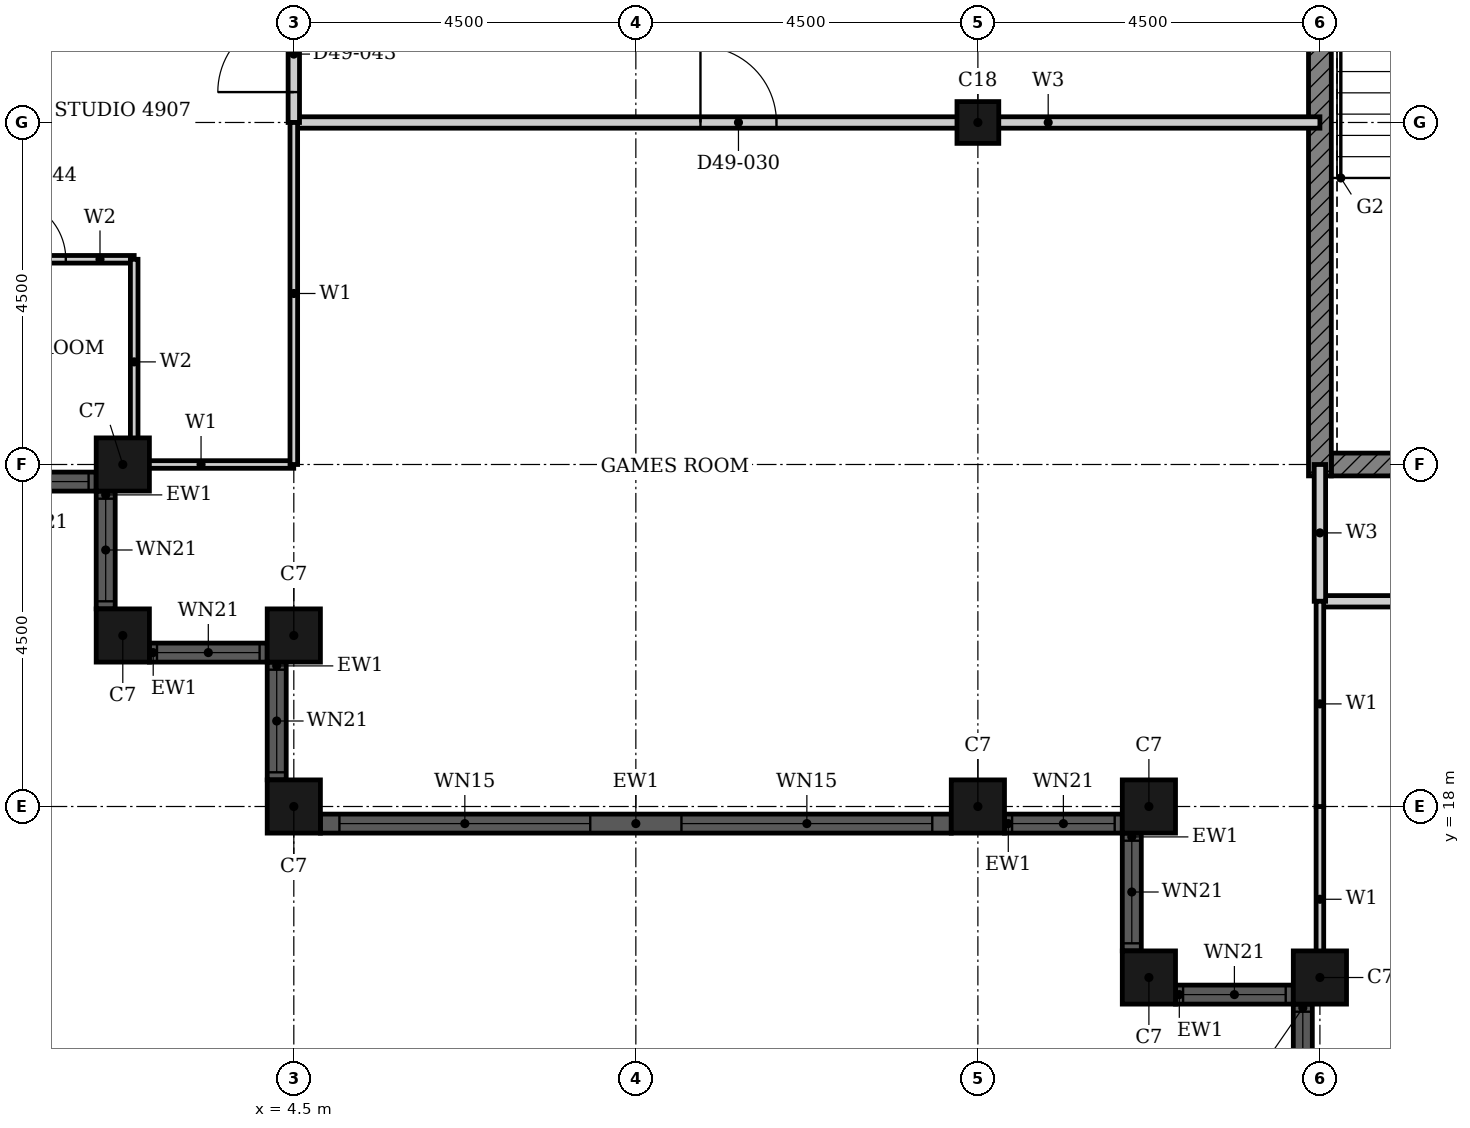
"""IFC4 building model, lengths in metres.
Left out: names, types, materials, properties, quantities, classifications, styles, units other than length and angle.
Written with IfcOpenShell. Run it as: python <this file> out.ifc"""

import sys

from ifc_helpers import new_model, si_unit, direction, frame, frame_2d, origin, origin_2d, place, context, subcontext, project, spatial, rectangle, hollow_rectangle, extrude, element, fill, save


model = new_model("IFC4")
c1 = context("Model", 3, precision=1e-05, world=origin(), true_north=direction((0.0, 1.0)))
c2 = subcontext(c1, "Body", "Model", "MODEL_VIEW")
j1 = project(units=[si_unit("LENGTHUNIT", "METRE"), si_unit("PLANEANGLEUNIT", "RADIAN")], contexts=[c1])
p1 = place(None, origin())
s1 = spatial("IfcSite", under=j1, at=p1, CompositionType="ELEMENT")
p2 = place(p1, origin())
s2 = spatial("IfcBuilding", under=s1, at=p2, CompositionType="ELEMENT")
p3 = place(p2, frame((0.0, 0.0, 196.1)))
s3 = spatial("IfcBuildingStorey", under=s2, at=p3, CompositionType="ELEMENT", Elevation=196.1)
for number, where, z_axis, x_axis in (
    (1, (2.25, 22.5, 0.0), (0.0, 0.0, 1.0), (1.0, 0.0, 0.0)),
    (2, (2.25, 20.25, 0.0), (0.0, 0.0, 1.0), (1.0, 0.0, 0.0)),
    (3, (4.5, 20.25, 0.0), (0.0, 0.0, 1.0), (1.0, 0.0, 0.0)),
    (4, (4.5, 18.0, 0.0), (0.0, 0.0, 1.0), (1.0, 0.0, 0.0)),
    (5, (13.5, 18.0, 0.0), (0.0, 0.0, 1.0), (1.0, 0.0, 0.0)),
    (6, (15.75, 18.0, 0.0), (0.0, 0.0, 1.0), (1.0, 0.0, 0.0)),
    (7, (15.75, 15.75, 0.0), (0.0, 0.0, 1.0), (1.0, 0.0, 0.0)),
    (8, (18.0, 15.75, 0.0), (0.0, 0.0, 1.0), (1.0, 0.0, 0.0)),
):
    element("IfcColumn", number, at=place(p3, frame(where, z_axis=z_axis, x_axis=x_axis)), inside=s3, PredefinedType="COLUMN", context=c2, shape_type="SweptSolid", body=[
        extrude(hollow_rectangle(XDim=0.7, YDim=0.7, WallThickness=0.022, at=origin_2d()), origin(), (0.0, 0.0, 1.0), 3.7),
    ])
p4 = place(p3, frame((13.5, 27.0, 0.0), z_axis=(0.0, 0.0, 1.0), x_axis=(1.0, 0.0, 0.0)))
e9 = element("IfcColumn", 9, at=p4, inside=s3, PredefinedType="COLUMN", context=c2, shape_type="SweptSolid", body=[
    extrude(hollow_rectangle(XDim=0.55, YDim=0.55, WallThickness=0.018, at=origin_2d()), origin(), (0.0, 0.0, 1.0), 3.7),
])
p5 = place(p3, frame((0.35, 22.275, 0.0), z_axis=(0.0, 0.0, 1.0), x_axis=(1.0, 0.0, 0.0)))
e10 = element("IfcWall", 10, at=p5, inside=s3, PredefinedType="SOLIDWALL", context=c2, shape_type="SweptSolid", body=[
    extrude(rectangle(XDim=1.55, YDim=0.25, at=frame_2d((0.775, 0.0))), origin(), (0.0, 0.0, 1.0), 3.7),
])
p6 = place(p5, frame((0.1, 0.0, 0.9)))
e11 = element("IfcOpeningElement", 11, at=p6, cuts=e10, PredefinedType="OPENING", context=c2, shape_type="SweptSolid", body=[
    extrude(rectangle(XDim=1.35, YDim=1.85, at=frame_2d((0.675, 0.925))), frame((0.0, 0.135, 0.0), z_axis=(0.0, -1.0, 0.0), x_axis=(1.0, 0.0, 0.0)), (0.0, 0.0, 1.0), 0.27),
])
p7 = place(p3, frame((2.025, 22.15, 0.0), z_axis=(0.0, 0.0, 1.0), x_axis=(0.0, -1.0, 0.0)))
e12 = element("IfcWall", 12, at=p7, inside=s3, PredefinedType="SOLIDWALL", context=c2, shape_type="SweptSolid", body=[
    extrude(rectangle(XDim=1.55, YDim=0.25, at=frame_2d((0.775, 0.0))), origin(), (0.0, 0.0, 1.0), 3.7),
])
p8 = place(p7, frame((0.1, 0.0, 0.9)))
e13 = element("IfcOpeningElement", 13, at=p8, cuts=e12, PredefinedType="OPENING", context=c2, shape_type="SweptSolid", body=[
    extrude(rectangle(XDim=1.35, YDim=1.85, at=frame_2d((0.675, 0.925))), frame((0.0, 0.135, 0.0), z_axis=(0.0, -1.0, 0.0), x_axis=(1.0, 0.0, 0.0)), (0.0, 0.0, 1.0), 0.27),
])
p9 = place(p3, frame((2.6, 20.025, 0.0), z_axis=(0.0, 0.0, 1.0), x_axis=(1.0, 0.0, 0.0)))
e14 = element("IfcWall", 14, at=p9, inside=s3, PredefinedType="SOLIDWALL", context=c2, shape_type="SweptSolid", body=[
    extrude(rectangle(XDim=1.55, YDim=0.25, at=frame_2d((0.775, 0.0))), origin(), (0.0, 0.0, 1.0), 3.7),
])
p10 = place(p9, frame((0.1, 0.0, 0.9)))
e15 = element("IfcOpeningElement", 15, at=p10, cuts=e14, PredefinedType="OPENING", context=c2, shape_type="SweptSolid", body=[
    extrude(rectangle(XDim=1.35, YDim=1.85, at=frame_2d((0.675, 0.925))), frame((0.0, 0.135, 0.0), z_axis=(0.0, -1.0, 0.0), x_axis=(1.0, 0.0, 0.0)), (0.0, 0.0, 1.0), 0.27),
])
p11 = place(p3, frame((4.275, 19.9, 0.0), z_axis=(0.0, 0.0, 1.0), x_axis=(0.0, -1.0, 0.0)))
e16 = element("IfcWall", 16, at=p11, inside=s3, PredefinedType="SOLIDWALL", context=c2, shape_type="SweptSolid", body=[
    extrude(rectangle(XDim=1.55, YDim=0.25, at=frame_2d((0.775, 0.0))), origin(), (0.0, 0.0, 1.0), 3.7),
])
p12 = place(p11, frame((0.1, 0.0, 0.9)))
e17 = element("IfcOpeningElement", 17, at=p12, cuts=e16, PredefinedType="OPENING", context=c2, shape_type="SweptSolid", body=[
    extrude(rectangle(XDim=1.35, YDim=1.85, at=frame_2d((0.675, 0.925))), frame((0.0, 0.135, 0.0), z_axis=(0.0, -1.0, 0.0), x_axis=(1.0, 0.0, 0.0)), (0.0, 0.0, 1.0), 0.27),
])
p13 = place(p3, frame((4.85, 17.775, 0.0), z_axis=(0.0, 0.0, 1.0), x_axis=(1.0, 0.0, 0.0)))
e18 = element("IfcWall", 18, at=p13, inside=s3, PredefinedType="SOLIDWALL", context=c2, shape_type="SweptSolid", body=[
    extrude(rectangle(XDim=8.3, YDim=0.25, at=frame_2d((4.15, 0.0))), origin(), (0.0, 0.0, 1.0), 3.7),
])
p14 = place(p13, frame((0.25, 0.0, 0.45)))
e19 = element("IfcOpeningElement", 19, at=p14, cuts=e18, PredefinedType="OPENING", context=c2, shape_type="SweptSolid", body=[
    extrude(rectangle(XDim=3.3, YDim=2.3, at=frame_2d((1.65, 1.15))), frame((0.0, 0.135, 0.0), z_axis=(0.0, -1.0, 0.0), x_axis=(1.0, 0.0, 0.0)), (0.0, 0.0, 1.0), 0.27),
])
p15 = place(p13, frame((4.75, 0.0, 0.45)))
e20 = element("IfcOpeningElement", 20, at=p15, cuts=e18, PredefinedType="OPENING", context=c2, shape_type="SweptSolid", body=[
    extrude(rectangle(XDim=3.3, YDim=2.3, at=frame_2d((1.65, 1.15))), frame((0.0, 0.135, 0.0), z_axis=(0.0, -1.0, 0.0), x_axis=(1.0, 0.0, 0.0)), (0.0, 0.0, 1.0), 0.27),
])
p16 = place(p3, frame((13.85, 17.775, 0.0), z_axis=(0.0, 0.0, 1.0), x_axis=(1.0, 0.0, 0.0)))
e21 = element("IfcWall", 21, at=p16, inside=s3, PredefinedType="SOLIDWALL", context=c2, shape_type="SweptSolid", body=[
    extrude(rectangle(XDim=1.55, YDim=0.25, at=frame_2d((0.775, 0.0))), origin(), (0.0, 0.0, 1.0), 3.7),
])
p17 = place(p16, frame((0.1, 0.0, 0.9)))
e22 = element("IfcOpeningElement", 22, at=p17, cuts=e21, PredefinedType="OPENING", context=c2, shape_type="SweptSolid", body=[
    extrude(rectangle(XDim=1.35, YDim=1.85, at=frame_2d((0.675, 0.925))), frame((0.0, 0.135, 0.0), z_axis=(0.0, -1.0, 0.0), x_axis=(1.0, 0.0, 0.0)), (0.0, 0.0, 1.0), 0.27),
])
p18 = place(p3, frame((15.525, 17.65, 0.0), z_axis=(0.0, 0.0, 1.0), x_axis=(0.0, -1.0, 0.0)))
e23 = element("IfcWall", 23, at=p18, inside=s3, PredefinedType="SOLIDWALL", context=c2, shape_type="SweptSolid", body=[
    extrude(rectangle(XDim=1.55, YDim=0.25, at=frame_2d((0.775, 0.0))), origin(), (0.0, 0.0, 1.0), 3.7),
])
p19 = place(p18, frame((0.1, 0.0, 0.9)))
e24 = element("IfcOpeningElement", 24, at=p19, cuts=e23, PredefinedType="OPENING", context=c2, shape_type="SweptSolid", body=[
    extrude(rectangle(XDim=1.35, YDim=1.85, at=frame_2d((0.675, 0.925))), frame((0.0, 0.135, 0.0), z_axis=(0.0, -1.0, 0.0), x_axis=(1.0, 0.0, 0.0)), (0.0, 0.0, 1.0), 0.27),
])
p20 = place(p3, frame((16.1, 15.525, 0.0), z_axis=(0.0, 0.0, 1.0), x_axis=(1.0, 0.0, 0.0)))
e25 = element("IfcWall", 25, at=p20, inside=s3, PredefinedType="SOLIDWALL", context=c2, shape_type="SweptSolid", body=[
    extrude(rectangle(XDim=1.55, YDim=0.25, at=frame_2d((0.775, 0.0))), origin(), (0.0, 0.0, 1.0), 3.7),
])
p21 = place(p20, frame((0.1, 0.0, 0.9)))
e26 = element("IfcOpeningElement", 26, at=p21, cuts=e25, PredefinedType="OPENING", context=c2, shape_type="SweptSolid", body=[
    extrude(rectangle(XDim=1.35, YDim=1.85, at=frame_2d((0.675, 0.925))), frame((0.0, 0.135, 0.0), z_axis=(0.0, -1.0, 0.0), x_axis=(1.0, 0.0, 0.0)), (0.0, 0.0, 1.0), 0.27),
])
p22 = place(p3, frame((17.775, 15.4, 0.0), z_axis=(0.0, 0.0, 1.0), x_axis=(0.0, -1.0, 0.0)))
e27 = element("IfcWall", 27, at=p22, inside=s3, PredefinedType="SOLIDWALL", context=c2, shape_type="SweptSolid", body=[
    extrude(rectangle(XDim=1.55, YDim=0.25, at=frame_2d((0.775, 0.0))), origin(), (0.0, 0.0, 1.0), 3.7),
])
p23 = place(p22, frame((0.1, 0.0, 0.9)))
e28 = element("IfcOpeningElement", 28, at=p23, cuts=e27, PredefinedType="OPENING", context=c2, shape_type="SweptSolid", body=[
    extrude(rectangle(XDim=1.35, YDim=1.85, at=frame_2d((0.675, 0.925))), frame((0.0, 0.135, 0.0), z_axis=(0.0, -1.0, 0.0), x_axis=(1.0, 0.0, 0.0)), (0.0, 0.0, 1.0), 0.27),
])
p24 = place(p3, frame((18.15, 22.5, 0.0), z_axis=(0.0, 0.0, 1.0), x_axis=(1.0, 0.0, 0.0)))
e29 = element("IfcWall", 29, at=p24, inside=s3, PredefinedType="SHEAR", context=c2, shape_type="SweptSolid", body=[
    extrude(rectangle(XDim=4.225, YDim=0.3, at=frame_2d((2.113, 0.0))), origin(), (0.0, 0.0, 1.0), 3.4),
])
p25 = place(p3, frame((18.0, 22.35, 0.0), z_axis=(0.0, 0.0, 1.0), x_axis=(0.0, 1.0, 0.0)))
e30 = element("IfcWall", 30, at=p25, inside=s3, PredefinedType="SHEAR", context=c2, shape_type="SweptSolid", body=[
    extrude(rectangle(XDim=9.3, YDim=0.3, at=frame_2d((4.65, 0.0))), origin(), (0.0, 0.0, 1.0), 3.4),
])
p26 = place(p3, frame((18.0, 20.7, 0.0), z_axis=(0.0, 0.0, 1.0), x_axis=(1.0, 0.0, 0.0)))
e31 = element("IfcWall", 31, at=p26, inside=s3, PredefinedType="PARTITIONING", context=c2, shape_type="SweptSolid", body=[
    extrude(rectangle(XDim=13.5, YDim=0.15, at=frame_2d((6.75, 0.0))), origin(), (0.0, 0.0, 1.0), 3.4),
])
p27 = place(p26, frame((6.25, 0.0, 0.0)))
e32 = element("IfcOpeningElement", 32, at=p27, cuts=e31, PredefinedType="OPENING", context=c2, shape_type="SweptSolid", body=[
    extrude(rectangle(XDim=1.0, YDim=2.1, at=frame_2d((0.5, 1.05))), frame((0.0, 0.085, 0.0), z_axis=(0.0, -1.0, 0.0), x_axis=(1.0, 0.0, 0.0)), (0.0, 0.0, 1.0), 0.17),
])
p28 = place(p3, frame((4.5, 27.0, 0.0), z_axis=(0.0, 0.0, 1.0), x_axis=(1.0, 0.0, 0.0)))
e33 = element("IfcWall", 33, at=p28, inside=s3, PredefinedType="PARTITIONING", context=c2, shape_type="SweptSolid", body=[
    extrude(rectangle(XDim=13.5, YDim=0.15, at=frame_2d((6.75, 0.0))), origin(), (0.0, 0.0, 1.0), 2.68),
])
p29 = place(p28, frame((5.35, 0.0, 0.0)))
e34 = element("IfcOpeningElement", 34, at=p29, cuts=e33, PredefinedType="OPENING", context=c2, shape_type="SweptSolid", body=[
    extrude(rectangle(XDim=1.0, YDim=2.1, at=frame_2d((0.5, 1.05))), frame((0.0, 0.085, 0.0), z_axis=(0.0, -1.0, 0.0), x_axis=(1.0, 0.0, 0.0)), (0.0, 0.0, 1.0), 0.17),
])
p30 = place(p3, frame((18.0, 20.7, 0.0), z_axis=(0.0, 0.0, 1.0), x_axis=(0.0, 1.0, 0.0)))
e35 = element("IfcWall", 35, at=p30, inside=s3, PredefinedType="PARTITIONING", context=c2, shape_type="SweptSolid", body=[
    extrude(rectangle(XDim=1.8, YDim=0.15, at=frame_2d((0.9, 0.0))), origin(), (0.0, 0.0, 1.0), 3.4),
])
p31 = place(p3, frame((4.5, 27.0, 0.0), z_axis=(0.0, 0.0, 1.0), x_axis=(0.0, 1.0, 0.0)))
e36 = element("IfcWall", 36, at=p31, inside=s3, PredefinedType="PARTITIONING", context=c2, shape_type="SweptSolid", body=[
    extrude(rectangle(XDim=1.8, YDim=0.15, at=frame_2d((0.9, 0.0))), origin(), (0.0, 0.0, 1.0), 3.4),
])
p32 = place(p31, frame((0.4, 0.0, 0.0)))
e37 = element("IfcOpeningElement", 37, at=p32, cuts=e36, PredefinedType="OPENING", context=c2, shape_type="SweptSolid", body=[
    extrude(rectangle(XDim=1.0, YDim=2.2, at=frame_2d((0.5, 1.1))), frame((0.0, 0.085, 0.0), z_axis=(0.0, -1.0, 0.0), x_axis=(1.0, 0.0, 0.0)), (0.0, 0.0, 1.0), 0.17),
])
p33 = place(p3, frame((2.06, 22.5, 0.0), z_axis=(0.0, 0.0, 1.0), x_axis=(1.0, 0.0, 0.0)))
e38 = element("IfcWall", 38, at=p33, inside=s3, PredefinedType="PARTITIONING", context=c2, shape_type="SweptSolid", body=[
    extrude(rectangle(XDim=2.439, YDim=0.1, at=frame_2d((1.219, 0.0))), origin(), (0.0, 0.0, 1.0), 2.68),
])
p34 = place(p3, frame((18.0, 15.56, 0.0), z_axis=(0.0, 0.0, 1.0), x_axis=(0.0, 1.0, 0.0)))
e39 = element("IfcWall", 39, at=p34, inside=s3, PredefinedType="PARTITIONING", context=c2, shape_type="SweptSolid", body=[
    extrude(rectangle(XDim=2.439, YDim=0.1, at=frame_2d((1.219, 0.0))), origin(), (0.0, 0.0, 1.0), 3.4),
])
p35 = place(p3, frame((18.0, 18.0, 0.0), z_axis=(0.0, 0.0, 1.0), x_axis=(0.0, 1.0, 0.0)))
e40 = element("IfcWall", 40, at=p35, inside=s3, PredefinedType="PARTITIONING", context=c2, shape_type="SweptSolid", body=[
    extrude(rectangle(XDim=2.7, YDim=0.1, at=frame_2d((1.35, 0.0))), origin(), (0.0, 0.0, 1.0), 3.4),
])
p36 = place(p3, frame((4.5, 22.5, 0.0), z_axis=(0.0, 0.0, 1.0), x_axis=(0.0, 1.0, 0.0)))
e41 = element("IfcWall", 41, at=p36, inside=s3, PredefinedType="PARTITIONING", context=c2, shape_type="SweptSolid", body=[
    extrude(rectangle(XDim=4.5, YDim=0.1, at=frame_2d((2.25, 0.0))), origin(), (0.0, 0.0, 1.0), 3.4),
])
p37 = place(p3, frame((-0.1, 25.2, 0.0), z_axis=(0.0, 0.0, 1.0), x_axis=(1.0, 0.0, 0.0)))
e42 = element("IfcWall", 42, at=p37, inside=s3, PredefinedType="PARTITIONING", context=c2, shape_type="SweptSolid", body=[
    extrude(rectangle(XDim=2.5, YDim=0.1, at=frame_2d((1.25, 0.0))), origin(), (0.0, 0.0, 1.0), 3.4),
])
p38 = place(p37, frame((0.8, 0.0, 0.0)))
e43 = element("IfcOpeningElement", 43, at=p38, cuts=e42, PredefinedType="OPENING", context=c2, shape_type="SweptSolid", body=[
    extrude(rectangle(XDim=0.8, YDim=2.1, at=frame_2d((0.4, 1.05))), frame((0.0, 0.06, 0.0), z_axis=(0.0, -1.0, 0.0), x_axis=(1.0, 0.0, 0.0)), (0.0, 0.0, 1.0), 0.12),
])
p39 = place(p3, frame((2.4, 22.5, 0.0), z_axis=(0.0, 0.0, 1.0), x_axis=(0.0, 1.0, 0.0)))
e44 = element("IfcWall", 44, at=p39, inside=s3, PredefinedType="PARTITIONING", context=c2, shape_type="SweptSolid", body=[
    extrude(rectangle(XDim=2.7, YDim=0.1, at=frame_2d((1.35, 0.0))), origin(), (0.0, 0.0, 1.0), 3.4),
])
p40 = place(p6, origin())
e45 = element("IfcWindow", 45, at=p40, inside=s3, PartitioningType="SINGLE_PANEL", PredefinedType="WINDOW", context=c2, shape_type="SweptSolid", body=[
    extrude(rectangle(XDim=1.35, YDim=1.85, at=frame_2d((0.675, 0.925))), frame((0.0, 0.03, 0.0), z_axis=(0.0, -1.0, 0.0), x_axis=(1.0, 0.0, 0.0)), (0.0, 0.0, 1.0), 0.06),
])
fill(e11, e45)
p41 = place(p8, origin())
e46 = element("IfcWindow", 46, at=p41, inside=s3, PartitioningType="SINGLE_PANEL", PredefinedType="WINDOW", context=c2, shape_type="SweptSolid", body=[
    extrude(rectangle(XDim=1.35, YDim=1.85, at=frame_2d((0.675, 0.925))), frame((0.0, 0.03, 0.0), z_axis=(0.0, -1.0, 0.0), x_axis=(1.0, 0.0, 0.0)), (0.0, 0.0, 1.0), 0.06),
])
fill(e13, e46)
p42 = place(p10, origin())
e47 = element("IfcWindow", 47, at=p42, inside=s3, PartitioningType="SINGLE_PANEL", PredefinedType="WINDOW", context=c2, shape_type="SweptSolid", body=[
    extrude(rectangle(XDim=1.35, YDim=1.85, at=frame_2d((0.675, 0.925))), frame((0.0, 0.03, 0.0), z_axis=(0.0, -1.0, 0.0), x_axis=(1.0, 0.0, 0.0)), (0.0, 0.0, 1.0), 0.06),
])
fill(e15, e47)
p43 = place(p12, origin())
e48 = element("IfcWindow", 48, at=p43, inside=s3, PartitioningType="SINGLE_PANEL", PredefinedType="WINDOW", context=c2, shape_type="SweptSolid", body=[
    extrude(rectangle(XDim=1.35, YDim=1.85, at=frame_2d((0.675, 0.925))), frame((0.0, 0.03, 0.0), z_axis=(0.0, -1.0, 0.0), x_axis=(1.0, 0.0, 0.0)), (0.0, 0.0, 1.0), 0.06),
])
fill(e17, e48)
p44 = place(p14, origin())
e49 = element("IfcWindow", 49, at=p44, inside=s3, PartitioningType="SINGLE_PANEL", PredefinedType="WINDOW", context=c2, shape_type="SweptSolid", body=[
    extrude(rectangle(XDim=3.3, YDim=2.3, at=frame_2d((1.65, 1.15))), frame((0.0, 0.03, 0.0), z_axis=(0.0, -1.0, 0.0), x_axis=(1.0, 0.0, 0.0)), (0.0, 0.0, 1.0), 0.06),
])
fill(e19, e49)
p45 = place(p15, origin())
e50 = element("IfcWindow", 50, at=p45, inside=s3, PartitioningType="SINGLE_PANEL", PredefinedType="WINDOW", context=c2, shape_type="SweptSolid", body=[
    extrude(rectangle(XDim=3.3, YDim=2.3, at=frame_2d((1.65, 1.15))), frame((0.0, 0.03, 0.0), z_axis=(0.0, -1.0, 0.0), x_axis=(1.0, 0.0, 0.0)), (0.0, 0.0, 1.0), 0.06),
])
fill(e20, e50)
p46 = place(p17, origin())
e51 = element("IfcWindow", 51, at=p46, inside=s3, PartitioningType="SINGLE_PANEL", PredefinedType="WINDOW", context=c2, shape_type="SweptSolid", body=[
    extrude(rectangle(XDim=1.35, YDim=1.85, at=frame_2d((0.675, 0.925))), frame((0.0, 0.03, 0.0), z_axis=(0.0, -1.0, 0.0), x_axis=(1.0, 0.0, 0.0)), (0.0, 0.0, 1.0), 0.06),
])
fill(e22, e51)
p47 = place(p19, origin())
e52 = element("IfcWindow", 52, at=p47, inside=s3, PartitioningType="SINGLE_PANEL", PredefinedType="WINDOW", context=c2, shape_type="SweptSolid", body=[
    extrude(rectangle(XDim=1.35, YDim=1.85, at=frame_2d((0.675, 0.925))), frame((0.0, 0.03, 0.0), z_axis=(0.0, -1.0, 0.0), x_axis=(1.0, 0.0, 0.0)), (0.0, 0.0, 1.0), 0.06),
])
fill(e24, e52)
p48 = place(p21, origin())
e53 = element("IfcWindow", 53, at=p48, inside=s3, PartitioningType="SINGLE_PANEL", PredefinedType="WINDOW", context=c2, shape_type="SweptSolid", body=[
    extrude(rectangle(XDim=1.35, YDim=1.85, at=frame_2d((0.675, 0.925))), frame((0.0, 0.03, 0.0), z_axis=(0.0, -1.0, 0.0), x_axis=(1.0, 0.0, 0.0)), (0.0, 0.0, 1.0), 0.06),
])
fill(e26, e53)
p49 = place(p23, origin())
e54 = element("IfcWindow", 54, at=p49, inside=s3, PartitioningType="SINGLE_PANEL", PredefinedType="WINDOW", context=c2, shape_type="SweptSolid", body=[
    extrude(rectangle(XDim=1.35, YDim=1.85, at=frame_2d((0.675, 0.925))), frame((0.0, 0.03, 0.0), z_axis=(0.0, -1.0, 0.0), x_axis=(1.0, 0.0, 0.0)), (0.0, 0.0, 1.0), 0.06),
])
fill(e28, e54)
p50 = place(p29, origin())
e55 = element("IfcDoor", 55, at=p50, inside=s3, OperationType="SINGLE_SWING_LEFT", PredefinedType="DOOR", context=c2, shape_type="SweptSolid", body=[
    extrude(rectangle(XDim=1.0, YDim=2.1, at=frame_2d((0.5, 1.05))), frame((0.0, 0.025, 0.0), z_axis=(0.0, -1.0, 0.0), x_axis=(1.0, 0.0, 0.0)), (0.0, 0.0, 1.0), 0.05),
])
fill(e34, e55)
p51 = place(p32, origin())
e56 = element("IfcDoor", 56, at=p51, inside=s3, OperationType="SINGLE_SWING_RIGHT", PredefinedType="DOOR", context=c2, shape_type="SweptSolid", body=[
    extrude(rectangle(XDim=1.0, YDim=2.2, at=frame_2d((0.5, 1.1))), frame((0.0, 0.025, 0.0), z_axis=(0.0, -1.0, 0.0), x_axis=(1.0, 0.0, 0.0)), (0.0, 0.0, 1.0), 0.05),
])
fill(e37, e56)
p52 = place(p38, origin())
e57 = element("IfcDoor", 57, at=p52, inside=s3, OperationType="SINGLE_SWING_RIGHT", PredefinedType="DOOR", context=c2, shape_type="SweptSolid", body=[
    extrude(rectangle(XDim=0.8, YDim=2.1, at=frame_2d((0.4, 1.05))), frame((0.0, 0.025, 0.0), z_axis=(0.0, -1.0, 0.0), x_axis=(1.0, 0.0, 0.0)), (0.0, 0.0, 1.0), 0.05),
])
fill(e43, e57)
save(model, sys.argv[1])
